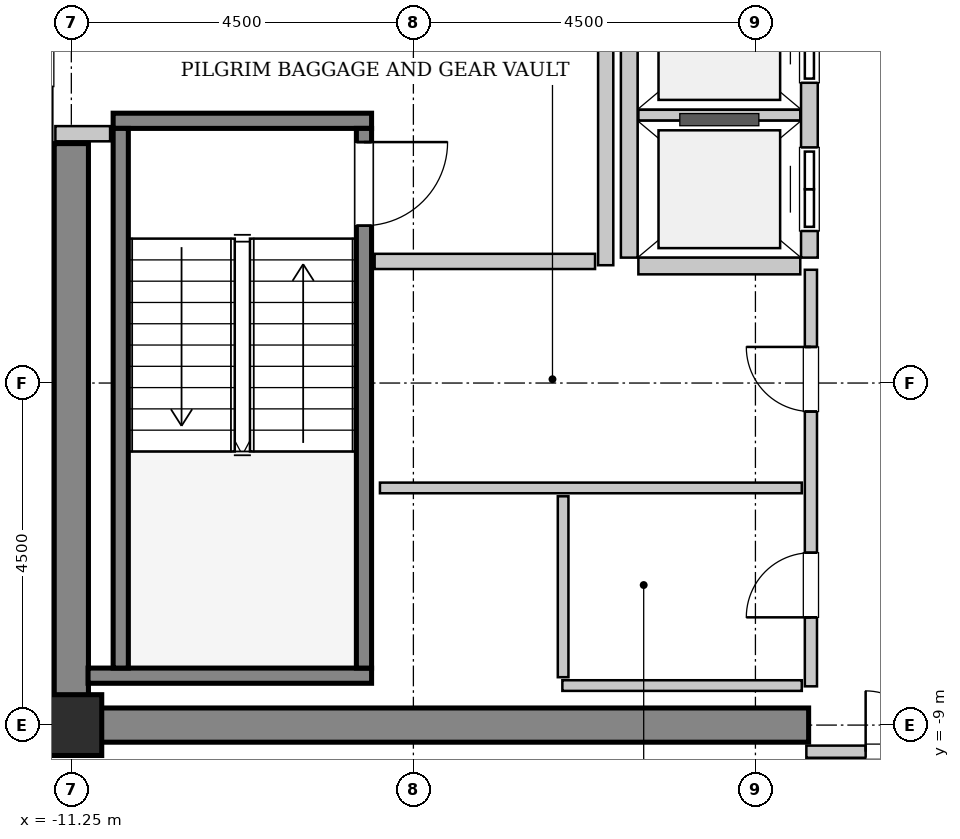
"""IFC4 building model, lengths in metres.
Left out: names, types, materials, properties, quantities, classifications, styles, units other than length and angle.
Written with IfcOpenShell. Run it as: python <this file> out.ifc"""

import sys

from ifc_helpers import new_model, si_unit, direction, frame, frame_2d, origin, origin_2d, place, context, subcontext, project, spatial, rectangle, hollow_rectangle, extrude, source, transform, mapped, element, fill, save


model = new_model("IFC4")
c1 = context("Model", 3, precision=1e-05, world=origin(), true_north=direction((0.0, 1.0)))
c2 = subcontext(c1, "Body", "Model", "MODEL_VIEW")
j1 = project(units=[si_unit("LENGTHUNIT", "METRE"), si_unit("PLANEANGLEUNIT", "RADIAN")], contexts=[c1])
p1 = place(None, origin())
s1 = spatial("IfcSite", under=j1, at=p1, CompositionType="ELEMENT")
p2 = place(p1, origin())
s2 = spatial("IfcBuilding", under=s1, at=p2, CompositionType="ELEMENT")
p3 = place(p2, frame((0.0, 0.0, 291.2)))
s3 = spatial("IfcBuildingStorey", under=s2, at=p3, CompositionType="ELEMENT", Elevation=291.2)
m1 = source(origin(), c2, "Body", "SweptSolid", [
    extrude(rectangle(XDim=9.925, YDim=0.45, at=frame_2d((4.962, 0.0))), origin(), (0.0, 0.0, 1.0), 3.8),
])
p4 = place(p3, frame((-11.475, -9.0, 0.0), z_axis=(0.0, 0.0, 1.0), x_axis=(1.0, 0.0, 0.0)))
e1 = element("IfcWall", 1, at=p4, inside=s3, PredefinedType="SHEAR", context=c2, shape_type="MappedRepresentation", body=[
    mapped(m1, transform((0.0, 0.0, 0.0), x_axis=(1.0, 0.0, 0.0), y_axis=(0.0, 1.0, 0.0), z_axis=(0.0, 0.0, 1.0), scale=1.0)),
])
m2 = source(origin(), c2, "Body", "SweptSolid", [
    extrude(rectangle(XDim=7.425, YDim=0.45, at=frame_2d((3.712, 0.0))), origin(), (0.0, 0.0, 1.0), 3.8),
])
p5 = place(p3, frame((-11.25, -8.775, 0.0), z_axis=(0.0, 0.0, 1.0), x_axis=(0.0, 1.0, 0.0)))
e2 = element("IfcWall", 2, at=p5, inside=s3, PredefinedType="SHEAR", context=c2, shape_type="MappedRepresentation", body=[
    mapped(m2, transform((0.0, 0.0, 0.0), x_axis=(1.0, 0.0, 0.0), y_axis=(0.0, 1.0, 0.0), z_axis=(0.0, 0.0, 1.0), scale=1.0)),
])
m3 = source(origin(), c2, "Body", "SweptSolid", [
    extrude(hollow_rectangle(XDim=0.8, YDim=0.8, WallThickness=0.04, InnerFilletRadius=0.04, OuterFilletRadius=0.08, at=origin_2d()), origin(), (0.0, 0.0, 1.0), 3.8),
])
p6 = place(p3, frame((-11.25, -9.0, 0.0), z_axis=(0.0, 0.0, 1.0), x_axis=(1.0, 0.0, 0.0)))
e3 = element("IfcColumn", 3, at=p6, inside=s3, PredefinedType="COLUMN", context=c2, shape_type="MappedRepresentation", body=[
    mapped(m3, transform((0.0, 0.0, 0.0), x_axis=(1.0, 0.0, 0.0), y_axis=(0.0, 1.0, 0.0), z_axis=(0.0, 0.0, 1.0), scale=1.0)),
])
m4 = source(origin(), c2, "Body", "SweptSolid", [
    extrude(rectangle(XDim=3.4, YDim=0.2, at=frame_2d((1.7, 0.0))), origin(), (0.0, 0.0, 1.0), 3.8),
])
p7 = place(p3, frame((-10.7, -1.05, 0.0), z_axis=(0.0, 0.0, 1.0), x_axis=(1.0, 0.0, 0.0)))
e4 = element("IfcWall", 4, at=p7, inside=s3, PredefinedType="SOLIDWALL", context=c2, shape_type="MappedRepresentation", body=[
    mapped(m4, transform((0.0, 0.0, 0.0), x_axis=(1.0, 0.0, 0.0), y_axis=(0.0, 1.0, 0.0), z_axis=(0.0, 0.0, 1.0), scale=1.0)),
])
m5 = source(origin(), c2, "Body", "SweptSolid", [
    extrude(rectangle(XDim=3.73, YDim=0.2, at=frame_2d((1.865, 0.0))), origin(), (0.0, 0.0, 1.0), 3.8),
])
p8 = place(p3, frame((-11.03, -8.35, 0.0), z_axis=(0.0, 0.0, 1.0), x_axis=(1.0, 0.0, 0.0)))
e5 = element("IfcWall", 5, at=p8, inside=s3, PredefinedType="SOLIDWALL", context=c2, shape_type="MappedRepresentation", body=[
    mapped(m5, transform((0.0, 0.0, 0.0), x_axis=(1.0, 0.0, 0.0), y_axis=(0.0, 1.0, 0.0), z_axis=(0.0, 0.0, 1.0), scale=1.0)),
])
m6 = source(origin(), c2, "Body", "SweptSolid", [
    extrude(rectangle(XDim=7.1, YDim=0.2, at=frame_2d((3.55, 0.0))), origin(), (0.0, 0.0, 1.0), 3.8),
])
p9 = place(p3, frame((-10.6, -1.15, 0.0), z_axis=(0.0, 0.0, 1.0), x_axis=(0.0, -1.0, 0.0)))
e6 = element("IfcWall", 6, at=p9, inside=s3, PredefinedType="SOLIDWALL", context=c2, shape_type="MappedRepresentation", body=[
    mapped(m6, transform((0.0, 0.0, 0.0), x_axis=(1.0, 0.0, 0.0), y_axis=(0.0, 1.0, 0.0), z_axis=(0.0, 0.0, 1.0), scale=1.0)),
])
p10 = place(p3, frame((-7.4, -1.15, 0.0), z_axis=(0.0, 0.0, 1.0), x_axis=(0.0, -1.0, 0.0)))
e7 = element("IfcWall", 7, at=p10, inside=s3, PredefinedType="SOLIDWALL", context=c2, shape_type="MappedRepresentation", body=[
    mapped(m6, transform((0.0, 0.0, 0.0), x_axis=(1.0, 0.0, 0.0), y_axis=(0.0, 1.0, 0.0), z_axis=(0.0, 0.0, 1.0), scale=1.0)),
])
p11 = place(p10, frame((0.18, 0.0, 0.0)))
e8 = element("IfcOpeningElement", 8, at=p11, cuts=e7, PredefinedType="OPENING", context=c2, shape_type="SweptSolid", body=[
    extrude(rectangle(XDim=1.1, YDim=2.15, at=frame_2d((0.55, 1.075))), frame((0.0, 0.11, 0.0), z_axis=(0.0, -1.0, 0.0), x_axis=(1.0, 0.0, 0.0)), (0.0, 0.0, 1.0), 0.22),
])
m7 = source(origin(), c2, "Body", "SweptSolid", [
    extrude(rectangle(XDim=5.7, YDim=0.22, at=frame_2d((2.85, 0.0))), origin(), (0.0, 0.0, 1.0), 3.535),
])
p12 = place(p3, frame((-1.54, -2.85, 0.0), z_axis=(0.0, 0.0, 1.0), x_axis=(0.0, 1.0, 0.0)))
e9 = element("IfcWall", 9, at=p12, inside=s3, PredefinedType="SOLIDWALL", context=c2, shape_type="MappedRepresentation", body=[
    mapped(m7, transform((0.0, 0.0, 0.0), x_axis=(1.0, 0.0, 0.0), y_axis=(0.0, 1.0, 0.0), z_axis=(0.0, 0.0, 1.0), scale=1.0)),
])
p13 = place(p12, frame((0.35, 0.0, 0.0)))
e10 = element("IfcOpeningElement", 10, at=p13, cuts=e9, PredefinedType="OPENING", context=c2, shape_type="SweptSolid", body=[
    extrude(rectangle(XDim=1.1, YDim=2.2, at=frame_2d((0.55, 1.1))), frame((0.0, 0.12, 0.0), z_axis=(0.0, -1.0, 0.0), x_axis=(1.0, 0.0, 0.0)), (0.0, 0.0, 1.0), 0.24),
])
p14 = place(p12, frame((2.3, 0.0, 0.0)))
e11 = element("IfcOpeningElement", 11, at=p14, cuts=e9, PredefinedType="OPENING", context=c2, shape_type="SweptSolid", body=[
    extrude(rectangle(XDim=1.1, YDim=2.2, at=frame_2d((0.55, 1.1))), frame((0.0, 0.12, 0.0), z_axis=(0.0, -1.0, 0.0), x_axis=(1.0, 0.0, 0.0)), (0.0, 0.0, 1.0), 0.24),
])
p15 = place(p12, frame((4.25, 0.0, 0.0)))
e12 = element("IfcOpeningElement", 12, at=p15, cuts=e9, PredefinedType="OPENING", context=c2, shape_type="SweptSolid", body=[
    extrude(rectangle(XDim=1.1, YDim=2.2, at=frame_2d((0.55, 1.1))), frame((0.0, 0.12, 0.0), z_axis=(0.0, -1.0, 0.0), x_axis=(1.0, 0.0, 0.0)), (0.0, 0.0, 1.0), 0.24),
])
p16 = place(p3, frame((-3.91, 2.85, 0.0), z_axis=(0.0, 0.0, 1.0), x_axis=(0.0, -1.0, 0.0)))
e13 = element("IfcWall", 13, at=p16, inside=s3, PredefinedType="SOLIDWALL", context=c2, shape_type="MappedRepresentation", body=[
    mapped(m7, transform((0.0, 0.0, 0.0), x_axis=(1.0, 0.0, 0.0), y_axis=(0.0, 1.0, 0.0), z_axis=(0.0, 0.0, 1.0), scale=1.0)),
])
m8 = source(origin(), c2, "Body", "SweptSolid", [
    extrude(rectangle(XDim=2.13, YDim=0.22, at=frame_2d((1.065, 0.0))), origin(), (0.0, 0.0, 1.0), 3.535),
])
p17 = place(p3, frame((-3.79, -2.96, 0.0), z_axis=(0.0, 0.0, 1.0), x_axis=(1.0, 0.0, 0.0)))
e14 = element("IfcWall", 14, at=p17, inside=s3, PredefinedType="SOLIDWALL", context=c2, shape_type="MappedRepresentation", body=[
    mapped(m8, transform((0.0, 0.0, 0.0), x_axis=(1.0, 0.0, 0.0), y_axis=(0.0, 1.0, 0.0), z_axis=(0.0, 0.0, 1.0), scale=1.0)),
])
m9 = source(origin(), c2, "Body", "SweptSolid", [
    extrude(rectangle(XDim=2.13, YDim=0.14, at=frame_2d((1.065, 0.0))), origin(), (0.0, 0.0, 1.0), 3.535),
])
p18 = place(p3, frame((-3.79, -0.975, 0.0), z_axis=(0.0, 0.0, 1.0), x_axis=(1.0, 0.0, 0.0)))
e15 = element("IfcWall", 15, at=p18, inside=s3, PredefinedType="PARTITIONING", context=c2, shape_type="MappedRepresentation", body=[
    mapped(m9, transform((0.0, 0.0, 0.0), x_axis=(1.0, 0.0, 0.0), y_axis=(0.0, 1.0, 0.0), z_axis=(0.0, 0.0, 1.0), scale=1.0)),
])
m10 = source(origin(), c2, "Body", "SweptSolid", [
    extrude(rectangle(XDim=5.9, YDim=0.2, at=frame_2d((2.95, 0.0))), origin(), (0.0, 0.0, 1.0), 3.535),
])
p19 = place(p3, frame((-4.22, -2.95, 0.0), z_axis=(0.0, 0.0, 1.0), x_axis=(0.0, 1.0, 0.0)))
e16 = element("IfcWall", 16, at=p19, inside=s3, PredefinedType="PARTITIONING", context=c2, shape_type="MappedRepresentation", body=[
    mapped(m10, transform((0.0, 0.0, 0.0), x_axis=(1.0, 0.0, 0.0), y_axis=(0.0, 1.0, 0.0), z_axis=(0.0, 0.0, 1.0), scale=1.0)),
])
m11 = source(origin(), c2, "Body", "SweptSolid", [
    extrude(rectangle(XDim=2.9, YDim=0.2, at=frame_2d((1.45, 0.0))), origin(), (0.0, 0.0, 1.0), 3.535),
])
p20 = place(p3, frame((-7.26, -2.9, 0.0), z_axis=(0.0, 0.0, 1.0), x_axis=(1.0, 0.0, 0.0)))
e17 = element("IfcWall", 17, at=p20, inside=s3, PredefinedType="PARTITIONING", context=c2, shape_type="MappedRepresentation", body=[
    mapped(m11, transform((0.0, 0.0, 0.0), x_axis=(1.0, 0.0, 0.0), y_axis=(0.0, 1.0, 0.0), z_axis=(0.0, 0.0, 1.0), scale=1.0)),
])
m12 = source(origin(), c2, "Body", "SweptSolid", [
    extrude(rectangle(XDim=0.72, YDim=0.2, at=frame_2d((0.36, 0.0))), origin(), (0.0, 0.0, 1.0), 3.535),
])
p21 = place(p3, frame((-11.46, -1.22, 0.0), z_axis=(0.0, 0.0, 1.0), x_axis=(1.0, 0.0, 0.0)))
e18 = element("IfcWall", 18, at=p21, inside=s3, PredefinedType="PARTITIONING", context=c2, shape_type="MappedRepresentation", body=[
    mapped(m12, transform((0.0, 0.0, 0.0), x_axis=(1.0, 0.0, 0.0), y_axis=(0.0, 1.0, 0.0), z_axis=(0.0, 0.0, 1.0), scale=1.0)),
])
m13 = source(origin(), c2, "Body", "SweptSolid", [
    extrude(rectangle(XDim=3.16, YDim=0.16, at=frame_2d((1.58, 0.0))), origin(), (0.0, 0.0, 1.0), 2.625),
])
p22 = place(p3, frame((-1.58, -9.35, 0.0), z_axis=(0.0, 0.0, 1.0), x_axis=(1.0, 0.0, 0.0)))
e19 = element("IfcWall", 19, at=p22, inside=s3, PredefinedType="PARTITIONING", context=c2, shape_type="MappedRepresentation", body=[
    mapped(m13, transform((0.0, 0.0, 0.0), x_axis=(1.0, 0.0, 0.0), y_axis=(0.0, 1.0, 0.0), z_axis=(0.0, 0.0, 1.0), scale=1.0)),
])
p23 = place(p22, frame((0.78, 0.0, 0.0)))
e20 = element("IfcOpeningElement", 20, at=p23, cuts=e19, PredefinedType="OPENING", context=c2, shape_type="SweptSolid", body=[
    extrude(rectangle(XDim=1.6, YDim=2.3, at=frame_2d((0.8, 1.15))), frame((0.0, 0.09, 0.0), z_axis=(0.0, -1.0, 0.0), x_axis=(1.0, 0.0, 0.0)), (0.0, 0.0, 1.0), 0.18),
])
m14 = source(origin(), c2, "Body", "SweptSolid", [
    extrude(rectangle(XDim=5.48, YDim=0.16, at=frame_2d((2.74, 0.0))), origin(), (0.0, 0.0, 1.0), 3.535),
])
p24 = place(p3, frame((-1.52, -8.49, 0.0), z_axis=(0.0, 0.0, 1.0), x_axis=(0.0, 1.0, 0.0)))
e21 = element("IfcWall", 21, at=p24, inside=s3, PredefinedType="PARTITIONING", context=c2, shape_type="MappedRepresentation", body=[
    mapped(m14, transform((0.0, 0.0, 0.0), x_axis=(1.0, 0.0, 0.0), y_axis=(0.0, 1.0, 0.0), z_axis=(0.0, 0.0, 1.0), scale=1.0)),
])
p25 = place(p24, frame((0.907, 0.0, 0.0)))
e22 = element("IfcOpeningElement", 22, at=p25, cuts=e21, PredefinedType="OPENING", context=c2, shape_type="SweptSolid", body=[
    extrude(rectangle(XDim=0.85, YDim=2.1, at=frame_2d((0.425, 1.05))), frame((0.0, 0.09, 0.0), z_axis=(0.0, -1.0, 0.0), x_axis=(1.0, 0.0, 0.0)), (0.0, 0.0, 1.0), 0.18),
])
p26 = place(p24, frame((3.615, 0.0, 0.0)))
e23 = element("IfcOpeningElement", 23, at=p26, cuts=e21, PredefinedType="OPENING", context=c2, shape_type="SweptSolid", body=[
    extrude(rectangle(XDim=0.85, YDim=2.1, at=frame_2d((0.425, 1.05))), frame((0.0, 0.09, 0.0), z_axis=(0.0, -1.0, 0.0), x_axis=(1.0, 0.0, 0.0)), (0.0, 0.0, 1.0), 0.18),
])
m15 = source(origin(), c2, "Body", "SweptSolid", [
    extrude(rectangle(XDim=5.55, YDim=0.14, at=frame_2d((2.775, 0.0))), origin(), (0.0, 0.0, 1.0), 3.535),
])
p27 = place(p3, frame((-7.19, -5.88, 0.0), z_axis=(0.0, 0.0, 1.0), x_axis=(1.0, 0.0, 0.0)))
e24 = element("IfcWall", 24, at=p27, inside=s3, PredefinedType="PARTITIONING", context=c2, shape_type="MappedRepresentation", body=[
    mapped(m15, transform((0.0, 0.0, 0.0), x_axis=(1.0, 0.0, 0.0), y_axis=(0.0, 1.0, 0.0), z_axis=(0.0, 0.0, 1.0), scale=1.0)),
])
m16 = source(origin(), c2, "Body", "SweptSolid", [
    extrude(rectangle(XDim=3.15, YDim=0.14, at=frame_2d((1.575, 0.0))), origin(), (0.0, 0.0, 1.0), 3.535),
])
p28 = place(p3, frame((-4.79, -8.48, 0.0), z_axis=(0.0, 0.0, 1.0), x_axis=(1.0, 0.0, 0.0)))
e25 = element("IfcWall", 25, at=p28, inside=s3, PredefinedType="PARTITIONING", context=c2, shape_type="MappedRepresentation", body=[
    mapped(m16, transform((0.0, 0.0, 0.0), x_axis=(1.0, 0.0, 0.0), y_axis=(0.0, 1.0, 0.0), z_axis=(0.0, 0.0, 1.0), scale=1.0)),
])
m17 = source(origin(), c2, "Body", "SweptSolid", [
    extrude(rectangle(XDim=2.38, YDim=0.14, at=frame_2d((1.19, 0.0))), origin(), (0.0, 0.0, 1.0), 3.535),
])
p29 = place(p3, frame((-4.78, -8.37, 0.0), z_axis=(0.0, 0.0, 1.0), x_axis=(0.0, 1.0, 0.0)))
e26 = element("IfcWall", 26, at=p29, inside=s3, PredefinedType="PARTITIONING", context=c2, shape_type="MappedRepresentation", body=[
    mapped(m17, transform((0.0, 0.0, 0.0), x_axis=(1.0, 0.0, 0.0), y_axis=(0.0, 1.0, 0.0), z_axis=(0.0, 0.0, 1.0), scale=1.0)),
])
m18 = source(origin(), c2, "Body", "SweptSolid", [
    extrude(rectangle(XDim=1.1, YDim=2.15, at=frame_2d((0.55, 1.075))), frame((0.0, 0.025, 0.0), z_axis=(0.0, -1.0, 0.0), x_axis=(1.0, 0.0, 0.0)), (0.0, 0.0, 1.0), 0.05),
])
p30 = place(p11, origin())
e27 = element("IfcDoor", 27, at=p30, inside=s3, OperationType="SINGLE_SWING_LEFT", PredefinedType="DOOR", context=c2, shape_type="MappedRepresentation", body=[
    mapped(m18, transform((0.0, 0.0, 0.0), x_axis=(1.0, 0.0, 0.0), y_axis=(0.0, 1.0, 0.0), z_axis=(0.0, 0.0, 1.0), scale=1.0)),
])
fill(e8, e27)
m19 = source(origin(), c2, "Body", "SweptSolid", [
    extrude(rectangle(XDim=1.1, YDim=2.2, at=frame_2d((0.55, 1.1))), frame((0.0, 0.025, 0.0), z_axis=(0.0, -1.0, 0.0), x_axis=(1.0, 0.0, 0.0)), (0.0, 0.0, 1.0), 0.05),
])
p31 = place(p13, origin())
e28 = element("IfcDoor", 28, at=p31, inside=s3, OperationType="DOUBLE_DOOR_SLIDING", PredefinedType="DOOR", context=c2, shape_type="MappedRepresentation", body=[
    mapped(m19, transform((0.0, 0.0, 0.0), x_axis=(1.0, 0.0, 0.0), y_axis=(0.0, 1.0, 0.0), z_axis=(0.0, 0.0, 1.0), scale=1.0)),
])
fill(e10, e28)
p32 = place(p14, origin())
e29 = element("IfcDoor", 29, at=p32, inside=s3, OperationType="DOUBLE_DOOR_SLIDING", PredefinedType="DOOR", context=c2, shape_type="MappedRepresentation", body=[
    mapped(m19, transform((0.0, 0.0, 0.0), x_axis=(1.0, 0.0, 0.0), y_axis=(0.0, 1.0, 0.0), z_axis=(0.0, 0.0, 1.0), scale=1.0)),
])
fill(e11, e29)
m20 = source(origin(), c2, "Body", "SweptSolid", [
    extrude(rectangle(XDim=1.6, YDim=2.3, at=frame_2d((0.8, 1.15))), frame((0.0, 0.025, 0.0), z_axis=(0.0, -1.0, 0.0), x_axis=(1.0, 0.0, 0.0)), (0.0, 0.0, 1.0), 0.05),
])
p33 = place(p23, origin())
e30 = element("IfcDoor", 30, at=p33, inside=s3, OperationType="DOUBLE_DOOR_SINGLE_SWING", PredefinedType="DOOR", context=c2, shape_type="MappedRepresentation", body=[
    mapped(m20, transform((0.0, 0.0, 0.0), x_axis=(1.0, 0.0, 0.0), y_axis=(0.0, 1.0, 0.0), z_axis=(0.0, 0.0, 1.0), scale=1.0)),
])
fill(e20, e30)
m21 = source(origin(), c2, "Body", "SweptSolid", [
    extrude(rectangle(XDim=0.85, YDim=2.1, at=frame_2d((0.425, 1.05))), frame((0.0, 0.025, 0.0), z_axis=(0.0, -1.0, 0.0), x_axis=(1.0, 0.0, 0.0)), (0.0, 0.0, 1.0), 0.05),
])
p34 = place(p25, origin())
e31 = element("IfcDoor", 31, at=p34, inside=s3, OperationType="SINGLE_SWING_LEFT", PredefinedType="DOOR", context=c2, shape_type="MappedRepresentation", body=[
    mapped(m21, transform((0.0, 0.0, 0.0), x_axis=(1.0, 0.0, 0.0), y_axis=(0.0, 1.0, 0.0), z_axis=(0.0, 0.0, 1.0), scale=1.0)),
])
fill(e22, e31)
p35 = place(p26, origin())
e32 = element("IfcDoor", 32, at=p35, inside=s3, OperationType="SINGLE_SWING_RIGHT", PredefinedType="DOOR", context=c2, shape_type="MappedRepresentation", body=[
    mapped(m21, transform((0.0, 0.0, 0.0), x_axis=(1.0, 0.0, 0.0), y_axis=(0.0, 1.0, 0.0), z_axis=(0.0, 0.0, 1.0), scale=1.0)),
])
fill(e23, e32)
save(model, sys.argv[1])
